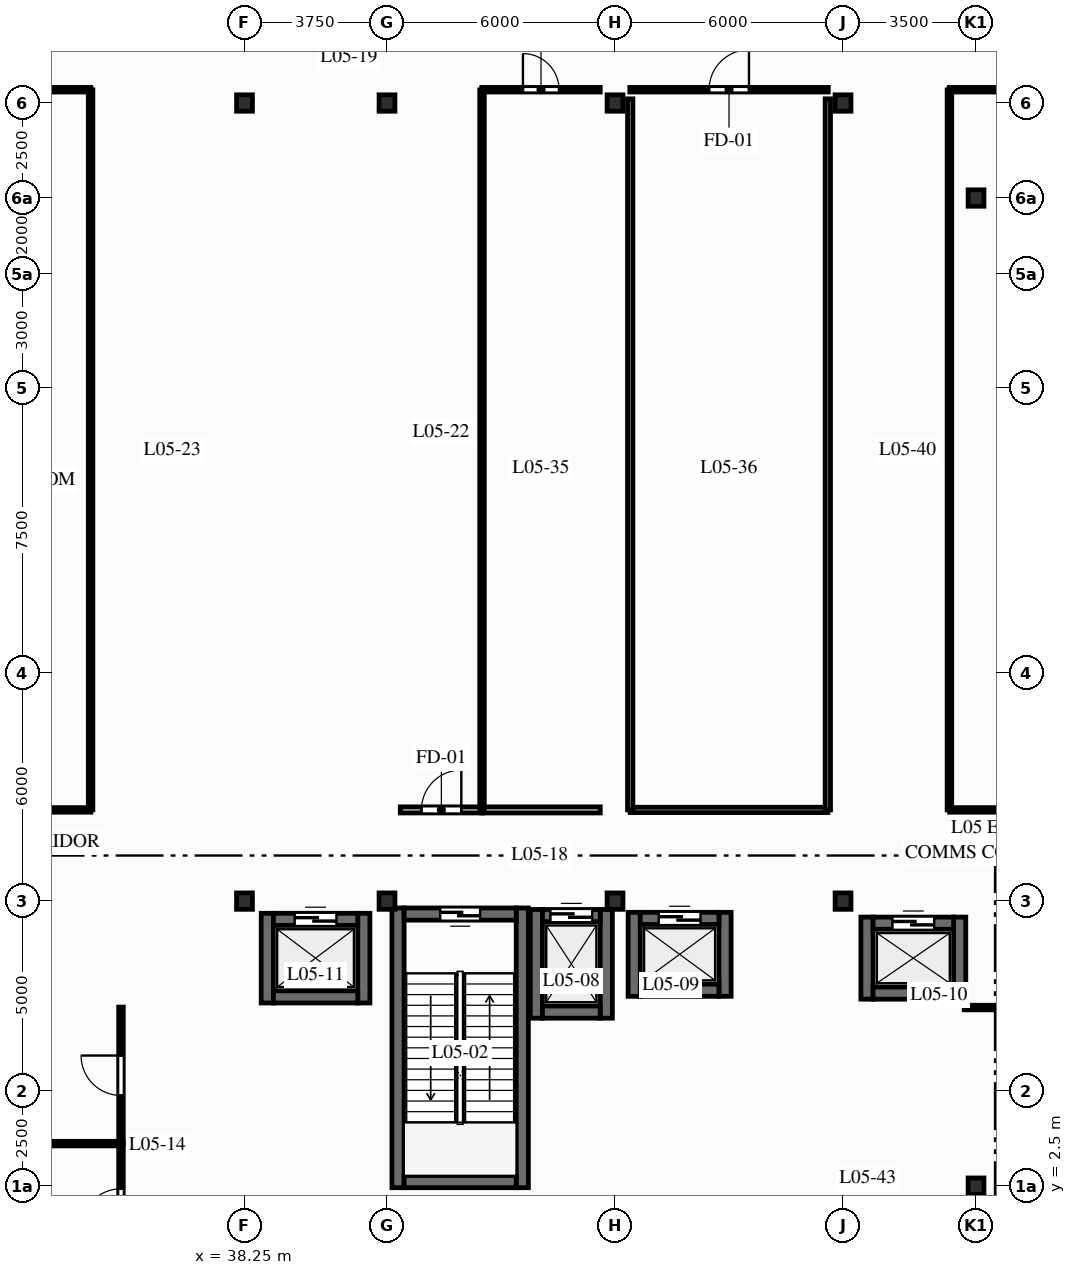
"""IFC4 building model, lengths in metres.
Left out: names, types, materials, properties, quantities, classifications, styles, units other than length and angle.
Written with IfcOpenShell. Run it as: python <this file> out.ifc"""

import sys

from ifc_helpers import new_model, si_unit, direction, frame, frame_2d, origin, origin_2d, place, context, subcontext, project, spatial, rectangle, i_section, extrude, element, fill, save


model = new_model("IFC4")
c1 = context("Model", 3, precision=1e-05, world=origin(), true_north=direction((0.0, 1.0)))
c2 = subcontext(c1, "Body", "Model", "MODEL_VIEW")
j1 = project(units=[si_unit("LENGTHUNIT", "METRE"), si_unit("PLANEANGLEUNIT", "RADIAN")], contexts=[c1])
p1 = place(None, origin())
s1 = spatial("IfcSite", under=j1, at=p1, CompositionType="ELEMENT")
p2 = place(p1, origin())
s2 = spatial("IfcBuilding", under=s1, at=p2, CompositionType="ELEMENT")
p3 = place(p2, frame((0.0, 0.0, 22.5)))
s3 = spatial("IfcBuildingStorey", under=s2, at=p3, CompositionType="ELEMENT", Elevation=22.5)
for number, where, z_axis, x_axis in (
    (1, (38.25, 10.0, 0.0), (0.0, 0.0, 1.0), (1.0, 0.0, 0.0)),
    (2, (38.25, 31.0, 0.0), (0.0, 0.0, 1.0), (1.0, 0.0, 0.0)),
    (3, (42.0, 10.0, 0.0), (0.0, 0.0, 1.0), (1.0, 0.0, 0.0)),
    (4, (42.0, 31.0, 0.0), (0.0, 0.0, 1.0), (1.0, 0.0, 0.0)),
    (5, (48.0, 10.0, 0.0), (0.0, 0.0, 1.0), (1.0, 0.0, 0.0)),
    (6, (48.0, 31.0, 0.0), (0.0, 0.0, 1.0), (1.0, 0.0, 0.0)),
    (7, (54.0, 10.0, 0.0), (0.0, 0.0, 1.0), (1.0, 0.0, 0.0)),
    (8, (54.0, 31.0, 0.0), (0.0, 0.0, 1.0), (1.0, 0.0, 0.0)),
    (9, (57.5, 2.5, 0.0), (0.0, 0.0, 1.0), (1.0, 0.0, 0.0)),
    (10, (57.5, 28.5, 0.0), (0.0, 0.0, 1.0), (1.0, 0.0, 0.0)),
):
    element("IfcColumn", number, at=place(p3, frame(where, z_axis=z_axis, x_axis=x_axis)), inside=s3, PredefinedType="COLUMN", context=c2, shape_type="SweptSolid", body=[
        extrude(i_section(OverallWidth=0.417, OverallDepth=0.431, WebThickness=0.065, FlangeThickness=0.106, FilletRadius=0.015, at=origin_2d()), origin(), (0.0, 0.0, 1.0), 5.5),
    ])
for number, where, z_axis, x_axis in (
    (11, (42.29, 2.46, 0.0), (0.0, 0.0, 1.0), (0.0, 1.0, 0.0)),
    (12, (45.56, 2.46, 0.0), (0.0, 0.0, 1.0), (0.0, 1.0, 0.0)),
):
    element("IfcWall", number, at=place(p3, frame(where, z_axis=z_axis, x_axis=x_axis)), inside=s3, PredefinedType="SHEAR", context=c2, shape_type="SweptSolid", body=[
        extrude(rectangle(XDim=7.36, YDim=0.32, at=frame_2d((3.68, 0.0))), origin(), (0.0, 0.0, 1.0), 5.23),
    ])
p4 = place(p3, frame((42.45, 2.62, 0.0), z_axis=(0.0, 0.0, 1.0), x_axis=(1.0, 0.0, 0.0)))
e13 = element("IfcWall", 13, at=p4, inside=s3, PredefinedType="SHEAR", context=c2, shape_type="SweptSolid", body=[
    extrude(rectangle(XDim=2.95, YDim=0.32, at=frame_2d((1.475, 0.0))), origin(), (0.0, 0.0, 1.0), 5.23),
])
p5 = place(p3, frame((45.4, 9.66, 0.0), z_axis=(0.0, 0.0, 1.0), x_axis=(-1.0, 0.0, 0.0)))
e14 = element("IfcWall", 14, at=p5, inside=s3, PredefinedType="SHEAR", context=c2, shape_type="SweptSolid", body=[
    extrude(rectangle(XDim=2.95, YDim=0.32, at=frame_2d((1.475, 0.0))), origin(), (0.0, 0.0, 1.0), 5.23),
])
p6 = place(p5, frame((0.95, 0.0, 0.0)))
e15 = element("IfcOpeningElement", 15, at=p6, cuts=e14, PredefinedType="OPENING", context=c2, shape_type="SweptSolid", body=[
    extrude(rectangle(XDim=1.05, YDim=2.06, at=frame_2d((0.525, 1.03))), frame((0.0, 0.17, 0.0), z_axis=(0.0, -1.0, 0.0), x_axis=(1.0, 0.0, 0.0)), (0.0, 0.0, 1.0), 0.34),
])
for number, where, z_axis, x_axis in (
    (16, (45.93, 6.92, 0.0), (0.0, 0.0, 1.0), (0.0, 1.0, 0.0)),
    (17, (47.77, 6.92, 0.0), (0.0, 0.0, 1.0), (0.0, 1.0, 0.0)),
):
    element("IfcWall", number, at=place(p3, frame(where, z_axis=z_axis, x_axis=x_axis)), inside=s3, PredefinedType="SHEAR", context=c2, shape_type="SweptSolid", body=[
        extrude(rectangle(XDim=2.86, YDim=0.32, at=frame_2d((1.43, 0.0))), origin(), (0.0, 0.0, 1.0), 5.23),
    ])
p7 = place(p3, frame((46.09, 7.08, 0.0), z_axis=(0.0, 0.0, 1.0), x_axis=(1.0, 0.0, 0.0)))
e18 = element("IfcWall", 18, at=p7, inside=s3, PredefinedType="SHEAR", context=c2, shape_type="SweptSolid", body=[
    extrude(rectangle(XDim=1.52, YDim=0.32, at=frame_2d((0.76, 0.0))), origin(), (0.0, 0.0, 1.0), 5.23),
])
p8 = place(p3, frame((46.09, 9.62, 0.0), z_axis=(0.0, 0.0, 1.0), x_axis=(1.0, 0.0, 0.0)))
e19 = element("IfcWall", 19, at=p8, inside=s3, PredefinedType="SHEAR", context=c2, shape_type="SweptSolid", body=[
    extrude(rectangle(XDim=1.52, YDim=0.32, at=frame_2d((0.76, 0.0))), origin(), (0.0, 0.0, 1.0), 5.23),
])
p9 = place(p8, frame((0.21, 0.0, 0.0)))
e20 = element("IfcOpeningElement", 20, at=p9, cuts=e19, PredefinedType="OPENING", context=c2, shape_type="SweptSolid", body=[
    extrude(rectangle(XDim=1.1, YDim=2.06, at=frame_2d((0.55, 1.03))), frame((0.0, 0.17, 0.0), z_axis=(0.0, -1.0, 0.0), x_axis=(1.0, 0.0, 0.0)), (0.0, 0.0, 1.0), 0.34),
])
for number, where, z_axis, x_axis in (
    (21, (48.505, 7.495, 0.0), (0.0, 0.0, 1.0), (0.0, 1.0, 0.0)),
    (22, (50.895, 7.495, 0.0), (0.0, 0.0, 1.0), (0.0, 1.0, 0.0)),
):
    element("IfcWall", number, at=place(p3, frame(where, z_axis=z_axis, x_axis=x_axis)), inside=s3, PredefinedType="SHEAR", context=c2, shape_type="SweptSolid", body=[
        extrude(rectangle(XDim=2.21, YDim=0.32, at=frame_2d((1.105, 0.0))), origin(), (0.0, 0.0, 1.0), 5.23),
    ])
p10 = place(p3, frame((48.665, 7.655, 0.0), z_axis=(0.0, 0.0, 1.0), x_axis=(1.0, 0.0, 0.0)))
e23 = element("IfcWall", 23, at=p10, inside=s3, PredefinedType="SHEAR", context=c2, shape_type="SweptSolid", body=[
    extrude(rectangle(XDim=2.07, YDim=0.32, at=frame_2d((1.035, 0.0))), origin(), (0.0, 0.0, 1.0), 5.23),
])
p11 = place(p3, frame((48.665, 9.545, 0.0), z_axis=(0.0, 0.0, 1.0), x_axis=(1.0, 0.0, 0.0)))
e24 = element("IfcWall", 24, at=p11, inside=s3, PredefinedType="SHEAR", context=c2, shape_type="SweptSolid", body=[
    extrude(rectangle(XDim=2.07, YDim=0.32, at=frame_2d((1.035, 0.0))), origin(), (0.0, 0.0, 1.0), 5.23),
])
p12 = place(p11, frame((0.485, 0.0, 0.0)))
e25 = element("IfcOpeningElement", 25, at=p12, cuts=e24, PredefinedType="OPENING", context=c2, shape_type="SweptSolid", body=[
    extrude(rectangle(XDim=1.1, YDim=2.06, at=frame_2d((0.55, 1.03))), frame((0.0, 0.17, 0.0), z_axis=(0.0, -1.0, 0.0), x_axis=(1.0, 0.0, 0.0)), (0.0, 0.0, 1.0), 0.34),
])
for number, where, z_axis, x_axis in (
    (26, (54.63, 7.42, 0.0), (0.0, 0.0, 1.0), (0.0, 1.0, 0.0)),
    (27, (57.07, 7.42, 0.0), (0.0, 0.0, 1.0), (0.0, 1.0, 0.0)),
):
    element("IfcWall", number, at=place(p3, frame(where, z_axis=z_axis, x_axis=x_axis)), inside=s3, PredefinedType="SHEAR", context=c2, shape_type="SweptSolid", body=[
        extrude(rectangle(XDim=2.16, YDim=0.32, at=frame_2d((1.08, 0.0))), origin(), (0.0, 0.0, 1.0), 5.23),
    ])
p13 = place(p3, frame((54.79, 7.58, 0.0), z_axis=(0.0, 0.0, 1.0), x_axis=(1.0, 0.0, 0.0)))
e28 = element("IfcWall", 28, at=p13, inside=s3, PredefinedType="SHEAR", context=c2, shape_type="SweptSolid", body=[
    extrude(rectangle(XDim=2.12, YDim=0.32, at=frame_2d((1.06, 0.0))), origin(), (0.0, 0.0, 1.0), 5.23),
])
p14 = place(p3, frame((54.79, 9.42, 0.0), z_axis=(0.0, 0.0, 1.0), x_axis=(1.0, 0.0, 0.0)))
e29 = element("IfcWall", 29, at=p14, inside=s3, PredefinedType="SHEAR", context=c2, shape_type="SweptSolid", body=[
    extrude(rectangle(XDim=2.12, YDim=0.32, at=frame_2d((1.06, 0.0))), origin(), (0.0, 0.0, 1.0), 5.23),
])
p15 = place(p14, frame((0.51, 0.0, 0.0)))
e30 = element("IfcOpeningElement", 30, at=p15, cuts=e29, PredefinedType="OPENING", context=c2, shape_type="SweptSolid", body=[
    extrude(rectangle(XDim=1.1, YDim=2.06, at=frame_2d((0.55, 1.03))), frame((0.0, 0.17, 0.0), z_axis=(0.0, -1.0, 0.0), x_axis=(1.0, 0.0, 0.0)), (0.0, 0.0, 1.0), 0.34),
])
for number, where, z_axis, x_axis in (
    (31, (38.85, 7.32, 0.0), (0.0, 0.0, 1.0), (0.0, 1.0, 0.0)),
    (32, (41.39, 7.32, 0.0), (0.0, 0.0, 1.0), (0.0, 1.0, 0.0)),
):
    element("IfcWall", number, at=place(p3, frame(where, z_axis=z_axis, x_axis=x_axis)), inside=s3, PredefinedType="SHEAR", context=c2, shape_type="SweptSolid", body=[
        extrude(rectangle(XDim=2.36, YDim=0.32, at=frame_2d((1.18, 0.0))), origin(), (0.0, 0.0, 1.0), 5.23),
    ])
p16 = place(p3, frame((39.01, 7.48, 0.0), z_axis=(0.0, 0.0, 1.0), x_axis=(1.0, 0.0, 0.0)))
e33 = element("IfcWall", 33, at=p16, inside=s3, PredefinedType="SHEAR", context=c2, shape_type="SweptSolid", body=[
    extrude(rectangle(XDim=2.22, YDim=0.32, at=frame_2d((1.11, 0.0))), origin(), (0.0, 0.0, 1.0), 5.23),
])
p17 = place(p3, frame((39.01, 9.52, 0.0), z_axis=(0.0, 0.0, 1.0), x_axis=(1.0, 0.0, 0.0)))
e34 = element("IfcWall", 34, at=p17, inside=s3, PredefinedType="SHEAR", context=c2, shape_type="SweptSolid", body=[
    extrude(rectangle(XDim=2.22, YDim=0.32, at=frame_2d((1.11, 0.0))), origin(), (0.0, 0.0, 1.0), 5.23),
])
p18 = place(p17, frame((0.56, 0.0, 0.0)))
e35 = element("IfcOpeningElement", 35, at=p18, cuts=e34, PredefinedType="OPENING", context=c2, shape_type="SweptSolid", body=[
    extrude(rectangle(XDim=1.1, YDim=2.06, at=frame_2d((0.55, 1.03))), frame((0.0, 0.17, 0.0), z_axis=(0.0, -1.0, 0.0), x_axis=(1.0, 0.0, 0.0)), (0.0, 0.0, 1.0), 0.34),
])
p19 = place(p3, frame((35.0, 0.18, 0.0), z_axis=(0.0, 0.0, 1.0), x_axis=(0.0, 1.0, 0.0)))
e36 = element("IfcWall", 36, at=p19, inside=s3, PredefinedType="PARTITIONING", context=c2, shape_type="SweptSolid", body=[
    extrude(rectangle(XDim=3.451, YDim=0.12, at=frame_2d((1.726, 0.0))), origin(), (0.0, 0.0, 1.0), 5.23),
])
p20 = place(p19, frame((1.201, 0.0, 0.0)))
e37 = element("IfcOpeningElement", 37, at=p20, cuts=e36, PredefinedType="OPENING", context=c2, shape_type="SweptSolid", body=[
    extrude(rectangle(XDim=1.05, YDim=2.06, at=frame_2d((0.525, 1.03))), frame((0.0, 0.07, 0.0), z_axis=(0.0, -1.0, 0.0), x_axis=(1.0, 0.0, 0.0)), (0.0, 0.0, 1.0), 0.14),
])
p21 = place(p3, frame((35.0, 3.613, 0.0), z_axis=(0.0, 0.0, 1.0), x_axis=(0.0, 1.0, 0.0)))
e38 = element("IfcWall", 38, at=p21, inside=s3, PredefinedType="PARTITIONING", context=c2, shape_type="SweptSolid", body=[
    extrude(rectangle(XDim=3.598, YDim=0.12, at=frame_2d((1.799, 0.0))), origin(), (0.0, 0.0, 1.0), 5.23),
])
p22 = place(p21, frame((1.274, 0.0, 0.0)))
e39 = element("IfcOpeningElement", 39, at=p22, cuts=e38, PredefinedType="OPENING", context=c2, shape_type="SweptSolid", body=[
    extrude(rectangle(XDim=1.05, YDim=2.06, at=frame_2d((0.525, 1.03))), frame((0.0, 0.07, 0.0), z_axis=(0.0, -1.0, 0.0), x_axis=(1.0, 0.0, 0.0)), (0.0, 0.0, 1.0), 0.14),
])
p23 = place(p3, frame((21.95, 3.62, 0.0), z_axis=(0.0, 0.0, 1.0), x_axis=(1.0, 0.0, 0.0)))
e40 = element("IfcWall", 40, at=p23, inside=s3, PredefinedType="PARTITIONING", context=c2, shape_type="SweptSolid", body=[
    extrude(rectangle(XDim=13.046, YDim=0.12, at=frame_2d((6.523, 0.0))), origin(), (0.0, 0.0, 1.0), 5.23),
])
p24 = place(p3, frame((42.35, 12.4, 0.0), z_axis=(0.0, 0.0, 1.0), x_axis=(1.0, 0.0, 0.0)))
e41 = element("IfcWall", 41, at=p24, inside=s3, PredefinedType="PARTITIONING", context=c2, shape_type="SweptSolid", body=[
    extrude(rectangle(XDim=2.161, YDim=0.16, at=frame_2d((1.081, 0.0))), origin(), (0.0, 0.0, 1.0), 5.23),
])
p25 = place(p24, frame((0.556, 0.0, 0.0)))
e42 = element("IfcOpeningElement", 42, at=p25, cuts=e41, PredefinedType="OPENING", context=c2, shape_type="SweptSolid", body=[
    extrude(rectangle(XDim=1.05, YDim=2.06, at=frame_2d((0.525, 1.03))), frame((0.0, 0.09, 0.0), z_axis=(0.0, -1.0, 0.0), x_axis=(1.0, 0.0, 0.0)), (0.0, 0.0, 1.0), 0.18),
])
p26 = place(p3, frame((44.493, 12.4, 0.0), z_axis=(0.0, 0.0, 1.0), x_axis=(1.0, 0.0, 0.0)))
e43 = element("IfcWall", 43, at=p26, inside=s3, PredefinedType="PARTITIONING", context=c2, shape_type="SweptSolid", body=[
    extrude(rectangle(XDim=3.119, YDim=0.16, at=frame_2d((1.559, 0.0))), origin(), (0.0, 0.0, 1.0), 5.23),
])
p27 = place(p3, frame((44.493, 31.35, 0.0), z_axis=(0.0, 0.0, 1.0), x_axis=(1.0, 0.0, 0.0)))
e44 = element("IfcWall", 44, at=p27, inside=s3, PredefinedType="PARTITIONING", context=c2, shape_type="SweptSolid", body=[
    extrude(rectangle(XDim=3.119, YDim=0.12, at=frame_2d((1.559, 0.0))), origin(), (0.0, 0.0, 1.0), 5.23),
])
p28 = place(p27, frame((1.084, 0.0, 0.0)))
e45 = element("IfcOpeningElement", 45, at=p28, cuts=e44, PredefinedType="OPENING", context=c2, shape_type="SweptSolid", body=[
    extrude(rectangle(XDim=0.95, YDim=2.05, at=frame_2d((0.475, 1.025))), frame((0.0, 0.07, 0.0), z_axis=(0.0, -1.0, 0.0), x_axis=(1.0, 0.0, 0.0)), (0.0, 0.0, 1.0), 0.14),
])
p29 = place(p3, frame((48.389, 31.35, 0.0), z_axis=(0.0, 0.0, 1.0), x_axis=(1.0, 0.0, 0.0)))
e46 = element("IfcWall", 46, at=p29, inside=s3, PredefinedType="PARTITIONING", context=c2, shape_type="SweptSolid", body=[
    extrude(rectangle(XDim=5.223, YDim=0.12, at=frame_2d((2.611, 0.0))), origin(), (0.0, 0.0, 1.0), 5.23),
])
p30 = place(p29, frame((2.086, 0.0, 0.0)))
e47 = element("IfcOpeningElement", 47, at=p30, cuts=e46, PredefinedType="OPENING", context=c2, shape_type="SweptSolid", body=[
    extrude(rectangle(XDim=1.05, YDim=2.06, at=frame_2d((0.525, 1.03))), frame((0.0, 0.07, 0.0), z_axis=(0.0, -1.0, 0.0), x_axis=(1.0, 0.0, 0.0)), (0.0, 0.0, 1.0), 0.14),
])
p31 = place(p3, frame((26.493, 31.35, 0.0), z_axis=(0.0, 0.0, 1.0), x_axis=(1.0, 0.0, 0.0)))
e48 = element("IfcWall", 48, at=p31, inside=s3, PredefinedType="PARTITIONING", context=c2, shape_type="SweptSolid", body=[
    extrude(rectangle(XDim=7.715, YDim=0.12, at=frame_2d((3.857, 0.0))), origin(), (0.0, 0.0, 1.0), 5.23),
])
p32 = place(p31, frame((3.257, 0.0, 0.0)))
e49 = element("IfcOpeningElement", 49, at=p32, cuts=e48, PredefinedType="OPENING", context=c2, shape_type="SweptSolid", body=[
    extrude(rectangle(XDim=1.2, YDim=2.08, at=frame_2d((0.6, 1.04))), frame((0.0, 0.07, 0.0), z_axis=(0.0, -1.0, 0.0), x_axis=(1.0, 0.0, 0.0)), (0.0, 0.0, 1.0), 0.14),
])
p33 = place(p3, frame((56.793, 31.35, 0.0), z_axis=(0.0, 0.0, 1.0), x_axis=(1.0, 0.0, 0.0)))
e50 = element("IfcWall", 50, at=p33, inside=s3, PredefinedType="PARTITIONING", context=c2, shape_type="SweptSolid", body=[
    extrude(rectangle(XDim=4.507, YDim=0.12, at=frame_2d((2.254, 0.0))), origin(), (0.0, 0.0, 1.0), 5.23),
])
p34 = place(p33, frame((1.779, 0.0, 0.0)))
e51 = element("IfcOpeningElement", 51, at=p34, cuts=e50, PredefinedType="OPENING", context=c2, shape_type="SweptSolid", body=[
    extrude(rectangle(XDim=0.95, YDim=2.05, at=frame_2d((0.475, 1.025))), frame((0.0, 0.07, 0.0), z_axis=(0.0, -1.0, 0.0), x_axis=(1.0, 0.0, 0.0)), (0.0, 0.0, 1.0), 0.14),
])
p35 = place(p3, frame((26.493, 12.4, 0.0), z_axis=(0.0, 0.0, 1.0), x_axis=(1.0, 0.0, 0.0)))
e52 = element("IfcWall", 52, at=p35, inside=s3, PredefinedType="PARTITIONING", context=c2, shape_type="SweptSolid", body=[
    extrude(rectangle(XDim=7.715, YDim=0.12, at=frame_2d((3.857, 0.0))), origin(), (0.0, 0.0, 1.0), 5.23),
])
for number, where, z_axis, x_axis in (
    (53, (44.5, 12.404, 0.0), (0.0, 0.0, 1.0), (0.0, 1.0, 0.0)),
    (54, (34.2, 12.404, 0.0), (0.0, 0.0, 1.0), (0.0, 1.0, 0.0)),
):
    element("IfcWall", number, at=place(p3, frame(where, z_axis=z_axis, x_axis=x_axis)), inside=s3, PredefinedType="PARTITIONING", context=c2, shape_type="SweptSolid", body=[
        extrude(rectangle(XDim=18.942, YDim=0.12, at=frame_2d((9.471, 0.0))), origin(), (0.0, 0.0, 1.0), 4.585),
    ])
p36 = place(p3, frame((56.8, 12.4, 0.0), z_axis=(0.0, 0.0, 1.0), x_axis=(0.0, 1.0, 0.0)))
e55 = element("IfcWall", 55, at=p36, inside=s3, PredefinedType="PARTITIONING", context=c2, shape_type="SweptSolid", body=[
    extrude(rectangle(XDim=18.946, YDim=0.12, at=frame_2d((9.473, 0.0))), origin(), (0.0, 0.0, 1.0), 4.585),
])
p37 = place(p3, frame((56.804, 12.4, 0.0), z_axis=(0.0, 0.0, 1.0), x_axis=(1.0, 0.0, 0.0)))
e56 = element("IfcWall", 56, at=p37, inside=s3, PredefinedType="PARTITIONING", context=c2, shape_type="SweptSolid", body=[
    extrude(rectangle(XDim=4.496, YDim=0.12, at=frame_2d((2.248, 0.0))), origin(), (0.0, 0.0, 1.0), 4.666),
])
p38 = place(p3, frame((57.189, 7.2, 0.0), z_axis=(0.0, 0.0, 1.0), x_axis=(1.0, 0.0, 0.0)))
e57 = element("IfcWall", 57, at=p38, inside=s3, PredefinedType="PARTITIONING", context=c2, shape_type="SweptSolid", body=[
    extrude(rectangle(XDim=4.111, YDim=0.12, at=frame_2d((2.056, 0.0))), origin(), (0.0, 0.0, 1.0), 5.23),
])
p39 = place(p38, frame((1.531, 0.0, 0.0)))
e58 = element("IfcOpeningElement", 58, at=p39, cuts=e57, PredefinedType="OPENING", context=c2, shape_type="SweptSolid", body=[
    extrude(rectangle(XDim=1.05, YDim=2.06, at=frame_2d((0.525, 1.03))), frame((0.0, 0.07, 0.0), z_axis=(0.0, -1.0, 0.0), x_axis=(1.0, 0.0, 0.0)), (0.0, 0.0, 1.0), 0.14),
])
p40 = place(p3, frame((48.4, 12.4, 0.0), z_axis=(0.0, 0.0, 1.0), x_axis=(1.0, 0.0, 0.0)))
e59 = element("IfcWall", 59, at=p40, inside=s3, PredefinedType="PARTITIONING", context=c2, shape_type="SweptSolid", body=[
    extrude(rectangle(XDim=5.2, YDim=0.14, at=frame_2d((2.6, 0.0))), origin(), (0.0, 0.0, 1.0), 5.23),
])
for number, where, z_axis, x_axis in (
    (60, (53.6, 12.4, 0.0), (0.0, 0.0, 1.0), (0.0, 1.0, 0.0)),
    (61, (48.4, 12.4, 0.0), (0.0, 0.0, 1.0), (0.0, 1.0, 0.0)),
):
    element("IfcWall", number, at=place(p3, frame(where, z_axis=z_axis, x_axis=x_axis)), inside=s3, PredefinedType="PARTITIONING", context=c2, shape_type="SweptSolid", body=[
        extrude(rectangle(XDim=18.71, YDim=0.14, at=frame_2d((9.355, 0.0))), origin(), (0.0, 0.0, 1.0), 3.405),
    ])
p41 = place(p6, origin())
e62 = element("IfcDoor", 62, at=p41, inside=s3, OperationType="SINGLE_SWING_RIGHT", PredefinedType="DOOR", context=c2, shape_type="SweptSolid", body=[
    extrude(rectangle(XDim=1.05, YDim=2.06, at=frame_2d((0.525, 1.03))), frame((0.0, 0.025, 0.0), z_axis=(0.0, -1.0, 0.0), x_axis=(1.0, 0.0, 0.0)), (0.0, 0.0, 1.0), 0.05),
])
fill(e15, e62)
p42 = place(p9, origin())
e63 = element("IfcDoor", 63, at=p42, inside=s3, OperationType="SLIDING_TO_RIGHT", PredefinedType="DOOR", context=c2, shape_type="SweptSolid", body=[
    extrude(rectangle(XDim=1.1, YDim=2.06, at=frame_2d((0.55, 1.03))), frame((0.0, 0.025, 0.0), z_axis=(0.0, -1.0, 0.0), x_axis=(1.0, 0.0, 0.0)), (0.0, 0.0, 1.0), 0.05),
])
fill(e20, e63)
p43 = place(p12, origin())
e64 = element("IfcDoor", 64, at=p43, inside=s3, OperationType="SLIDING_TO_LEFT", PredefinedType="DOOR", context=c2, shape_type="SweptSolid", body=[
    extrude(rectangle(XDim=1.1, YDim=2.06, at=frame_2d((0.55, 1.03))), frame((0.0, 0.025, 0.0), z_axis=(0.0, -1.0, 0.0), x_axis=(1.0, 0.0, 0.0)), (0.0, 0.0, 1.0), 0.05),
])
fill(e25, e64)
p44 = place(p15, origin())
e65 = element("IfcDoor", 65, at=p44, inside=s3, OperationType="SLIDING_TO_RIGHT", PredefinedType="DOOR", context=c2, shape_type="SweptSolid", body=[
    extrude(rectangle(XDim=1.1, YDim=2.06, at=frame_2d((0.55, 1.03))), frame((0.0, 0.025, 0.0), z_axis=(0.0, -1.0, 0.0), x_axis=(1.0, 0.0, 0.0)), (0.0, 0.0, 1.0), 0.05),
])
fill(e30, e65)
p45 = place(p18, origin())
e66 = element("IfcDoor", 66, at=p45, inside=s3, OperationType="SLIDING_TO_LEFT", PredefinedType="DOOR", context=c2, shape_type="SweptSolid", body=[
    extrude(rectangle(XDim=1.1, YDim=2.06, at=frame_2d((0.55, 1.03))), frame((0.0, 0.025, 0.0), z_axis=(0.0, -1.0, 0.0), x_axis=(1.0, 0.0, 0.0)), (0.0, 0.0, 1.0), 0.05),
])
fill(e35, e66)
p46 = place(p20, origin())
e67 = element("IfcDoor", 67, at=p46, inside=s3, OperationType="SINGLE_SWING_LEFT", PredefinedType="DOOR", context=c2, shape_type="SweptSolid", body=[
    extrude(rectangle(XDim=1.05, YDim=2.06, at=frame_2d((0.525, 1.03))), frame((0.0, 0.025, 0.0), z_axis=(0.0, -1.0, 0.0), x_axis=(1.0, 0.0, 0.0)), (0.0, 0.0, 1.0), 0.05),
])
fill(e37, e67)
p47 = place(p22, origin())
e68 = element("IfcDoor", 68, at=p47, inside=s3, OperationType="SINGLE_SWING_RIGHT", PredefinedType="DOOR", context=c2, shape_type="SweptSolid", body=[
    extrude(rectangle(XDim=1.05, YDim=2.06, at=frame_2d((0.525, 1.03))), frame((0.0, 0.025, 0.0), z_axis=(0.0, -1.0, 0.0), x_axis=(1.0, 0.0, 0.0)), (0.0, 0.0, 1.0), 0.05),
])
fill(e39, e68)
p48 = place(p25, origin())
e69 = element("IfcDoor", 69, at=p48, inside=s3, OperationType="SINGLE_SWING_RIGHT", PredefinedType="DOOR", context=c2, shape_type="SweptSolid", body=[
    extrude(rectangle(XDim=1.05, YDim=2.06, at=frame_2d((0.525, 1.03))), frame((0.0, 0.025, 0.0), z_axis=(0.0, -1.0, 0.0), x_axis=(1.0, 0.0, 0.0)), (0.0, 0.0, 1.0), 0.05),
])
fill(e42, e69)
p49 = place(p28, origin())
e70 = element("IfcDoor", 70, at=p49, inside=s3, OperationType="SINGLE_SWING_LEFT", PredefinedType="DOOR", context=c2, shape_type="SweptSolid", body=[
    extrude(rectangle(XDim=0.95, YDim=2.05, at=frame_2d((0.475, 1.025))), frame((0.0, 0.025, 0.0), z_axis=(0.0, -1.0, 0.0), x_axis=(1.0, 0.0, 0.0)), (0.0, 0.0, 1.0), 0.05),
])
fill(e45, e70)
p50 = place(p30, origin())
e71 = element("IfcDoor", 71, at=p50, inside=s3, OperationType="SINGLE_SWING_RIGHT", PredefinedType="DOOR", context=c2, shape_type="SweptSolid", body=[
    extrude(rectangle(XDim=1.05, YDim=2.06, at=frame_2d((0.525, 1.03))), frame((0.0, 0.025, 0.0), z_axis=(0.0, -1.0, 0.0), x_axis=(1.0, 0.0, 0.0)), (0.0, 0.0, 1.0), 0.05),
])
fill(e47, e71)
save(model, sys.argv[1])
